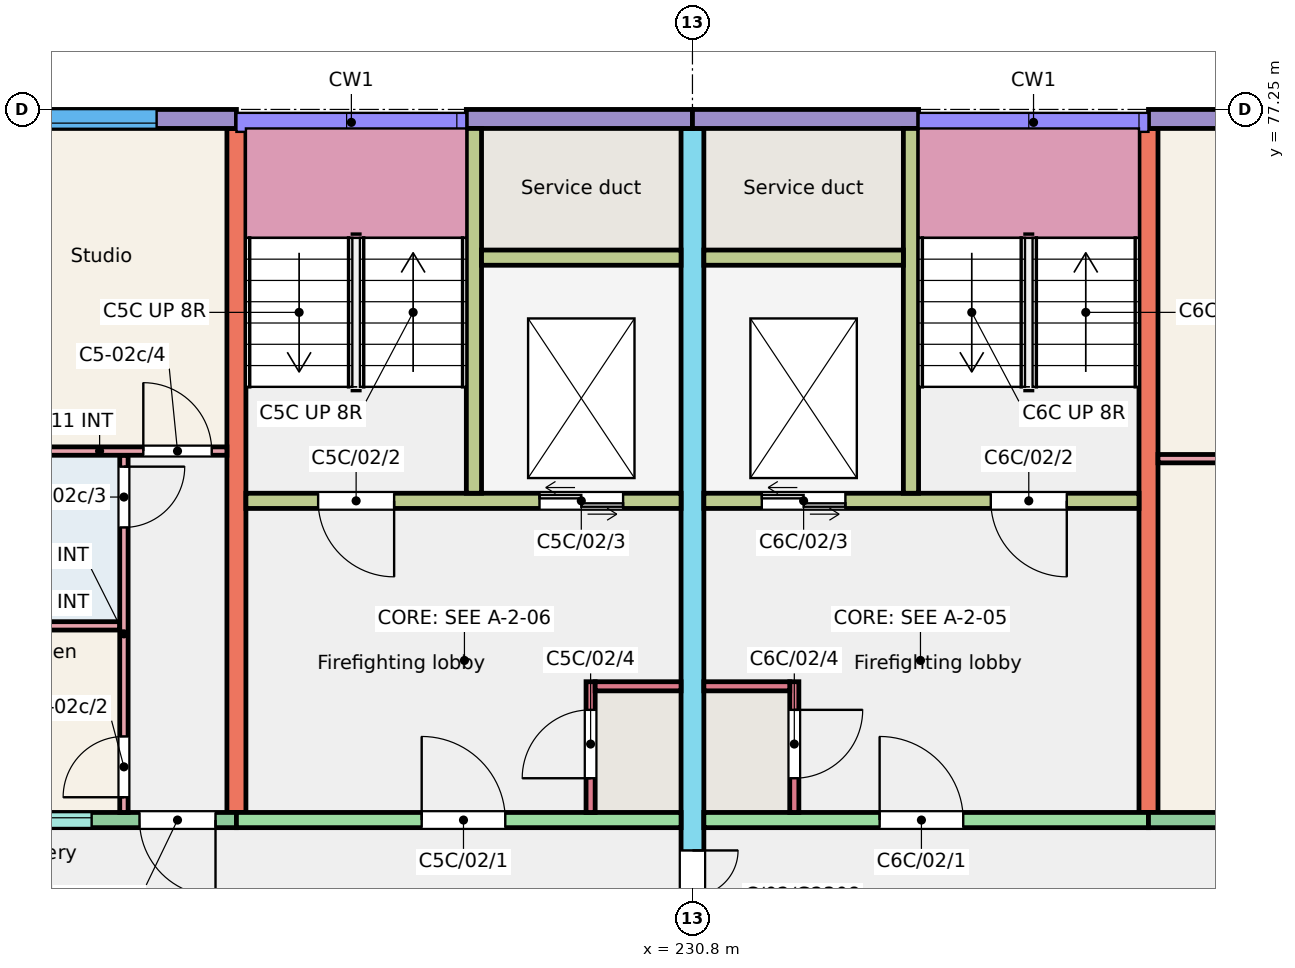
"""IFC4 building model, lengths in metres.
Left out: names, types, materials, properties, quantities, classifications, styles, units other than length and angle.
Written with IfcOpenShell. Run it as: python <this file> out.ifc"""

import sys

from ifc_helpers import new_model, si_unit, direction, frame, frame_2d, origin, place, context, subcontext, project, spatial, rectangle, extrude, element, fill, save


model = new_model("IFC4")
c1 = context("Model", 3, precision=1e-05, world=origin(), true_north=direction((0.0, 1.0)))
c2 = subcontext(c1, "Body", "Model", "MODEL_VIEW")
j1 = project(units=[si_unit("LENGTHUNIT", "METRE"), si_unit("PLANEANGLEUNIT", "RADIAN")], contexts=[c1])
p1 = place(None, origin())
s1 = spatial("IfcSite", under=j1, at=p1, CompositionType="ELEMENT")
p2 = place(p1, origin())
s2 = spatial("IfcBuilding", under=s1, at=p2, CompositionType="ELEMENT")
p3 = place(p2, frame((0.0, 0.0, 6.0)))
s3 = spatial("IfcBuildingStorey", under=s2, at=p3, CompositionType="ELEMENT", Elevation=6.0)
p4 = place(p3, frame((224.8, 68.0, 0.0), z_axis=(0.0, 0.0, 1.0), x_axis=(0.0, 1.0, 0.0)))
e1 = element("IfcWall", 1, at=p4, inside=s3, PredefinedType="SHEAR", context=c2, shape_type="SweptSolid", body=[
    extrude(rectangle(XDim=9.0, YDim=0.25, at=frame_2d((4.5, 0.0))), origin(), (0.0, 0.0, 1.0), 3.0),
])
p5 = place(p3, frame((230.8, 66.0, 0.0), z_axis=(0.0, 0.0, 1.0), x_axis=(0.0, 1.0, 0.0)))
e2 = element("IfcWall", 2, at=p5, inside=s3, PredefinedType="SHEAR", context=c2, shape_type="SweptSolid", body=[
    extrude(rectangle(XDim=11.0, YDim=0.3, at=frame_2d((5.5, 0.0))), origin(), (0.0, 0.0, 1.0), 3.0),
])
p6 = place(p5, frame((0.3, 0.0, 0.0)))
e3 = element("IfcOpeningElement", 3, at=p6, cuts=e2, PredefinedType="OPENING", context=c2, shape_type="SweptSolid", body=[
    extrude(rectangle(XDim=1.2, YDim=2.1, at=frame_2d((0.6, 1.05))), frame((0.0, 0.16, 0.0), z_axis=(0.0, -1.0, 0.0), x_axis=(1.0, 0.0, 0.0)), (0.0, 0.0, 1.0), 0.32),
])
p7 = place(p3, frame((236.8, 68.0, 0.0), z_axis=(0.0, 0.0, 1.0), x_axis=(0.0, 1.0, 0.0)))
e4 = element("IfcWall", 4, at=p7, inside=s3, PredefinedType="SHEAR", context=c2, shape_type="SweptSolid", body=[
    extrude(rectangle(XDim=9.0, YDim=0.25, at=frame_2d((4.5, 0.0))), origin(), (0.0, 0.0, 1.0), 3.0),
])
p8 = place(p3, frame((221.2, 77.125, 0.0), z_axis=(0.0, 0.0, 1.0), x_axis=(1.0, 0.0, 0.0)))
e5 = element("IfcWall", 5, at=p8, inside=s3, PredefinedType="SOLIDWALL", context=c2, shape_type="SweptSolid", body=[
    extrude(rectangle(XDim=3.6, YDim=0.25, at=frame_2d((1.8, 0.0))), origin(), (0.0, 0.0, 1.0), 3.0),
])
p9 = place(p8, frame((1.05, 0.0, 0.9)))
e6 = element("IfcOpeningElement", 6, at=p9, cuts=e5, PredefinedType="OPENING", context=c2, shape_type="SweptSolid", body=[
    extrude(rectangle(XDim=1.5, YDim=1.5, at=frame_2d((0.75, 0.75))), frame((0.0, 0.135, 0.0), z_axis=(0.0, -1.0, 0.0), x_axis=(1.0, 0.0, 0.0)), (0.0, 0.0, 1.0), 0.27),
])
p10 = place(p3, frame((221.2, 67.9, 0.0), z_axis=(0.0, 0.0, 1.0), x_axis=(1.0, 0.0, 0.0)))
e7 = element("IfcWall", 7, at=p10, inside=s3, PredefinedType="SOLIDWALL", context=c2, shape_type="SweptSolid", body=[
    extrude(rectangle(XDim=3.6, YDim=0.2, at=frame_2d((1.8, 0.0))), origin(), (0.0, 0.0, 1.0), 3.0),
])
p11 = place(p10, frame((0.495, 0.0, 1.1)))
e8 = element("IfcOpeningElement", 8, at=p11, cuts=e7, PredefinedType="OPENING", context=c2, shape_type="SweptSolid", body=[
    extrude(rectangle(XDim=1.2, YDim=1.3, at=frame_2d((0.6, 0.65))), frame((0.0, 0.11, 0.0), z_axis=(0.0, -1.0, 0.0), x_axis=(1.0, 0.0, 0.0)), (0.0, 0.0, 1.0), 0.22),
])
p12 = place(p10, frame((2.325, 0.0, 0.0)))
e9 = element("IfcOpeningElement", 9, at=p12, cuts=e7, PredefinedType="OPENING", context=c2, shape_type="SweptSolid", body=[
    extrude(rectangle(XDim=1.0, YDim=2.1, at=frame_2d((0.5, 1.05))), frame((0.0, 0.11, 0.0), z_axis=(0.0, -1.0, 0.0), x_axis=(1.0, 0.0, 0.0)), (0.0, 0.0, 1.0), 0.22),
])
p13 = place(p3, frame((227.825, 77.125, 0.0), z_axis=(0.0, 0.0, 1.0), x_axis=(1.0, 0.0, 0.0)))
e10 = element("IfcWall", 10, at=p13, inside=s3, PredefinedType="SOLIDWALL", context=c2, shape_type="SweptSolid", body=[
    extrude(rectangle(XDim=2.975, YDim=0.25, at=frame_2d((1.488, 0.0))), origin(), (0.0, 0.0, 1.0), 3.0),
])
p14 = place(p3, frame((224.8, 67.9, 0.0), z_axis=(0.0, 0.0, 1.0), x_axis=(1.0, 0.0, 0.0)))
e11 = element("IfcWall", 11, at=p14, inside=s3, PredefinedType="SHEAR", context=c2, shape_type="SweptSolid", body=[
    extrude(rectangle(XDim=5.85, YDim=0.2, at=frame_2d((2.925, 0.0))), origin(), (0.0, 0.0, 1.0), 3.0),
])
p15 = place(p14, frame((2.438, 0.0, 0.0)))
e12 = element("IfcOpeningElement", 12, at=p15, cuts=e11, PredefinedType="OPENING", context=c2, shape_type="SweptSolid", body=[
    extrude(rectangle(XDim=1.1, YDim=2.1, at=frame_2d((0.55, 1.05))), frame((0.0, 0.11, 0.0), z_axis=(0.0, -1.0, 0.0), x_axis=(1.0, 0.0, 0.0)), (0.0, 0.0, 1.0), 0.22),
])
p16 = place(p3, frame((224.925, 72.1, 0.0), z_axis=(0.0, 0.0, 1.0), x_axis=(1.0, 0.0, 0.0)))
e13 = element("IfcWall", 13, at=p16, inside=s3, PredefinedType="SHEAR", context=c2, shape_type="SweptSolid", body=[
    extrude(rectangle(XDim=5.725, YDim=0.2, at=frame_2d((2.862, 0.0))), origin(), (0.0, 0.0, 1.0), 3.0),
])
p17 = place(p16, frame((0.95, 0.0, 0.0)))
e14 = element("IfcOpeningElement", 14, at=p17, cuts=e13, PredefinedType="OPENING", context=c2, shape_type="SweptSolid", body=[
    extrude(rectangle(XDim=1.0, YDim=2.1, at=frame_2d((0.5, 1.05))), frame((0.0, 0.11, 0.0), z_axis=(0.0, -1.0, 0.0), x_axis=(1.0, 0.0, 0.0)), (0.0, 0.0, 1.0), 0.22),
])
p18 = place(p16, frame((3.863, 0.0, 0.0)))
e15 = element("IfcOpeningElement", 15, at=p18, cuts=e13, PredefinedType="OPENING", context=c2, shape_type="SweptSolid", body=[
    extrude(rectangle(XDim=1.1, YDim=2.1, at=frame_2d((0.55, 1.05))), frame((0.0, 0.11, 0.0), z_axis=(0.0, -1.0, 0.0), x_axis=(1.0, 0.0, 0.0)), (0.0, 0.0, 1.0), 0.22),
])
p19 = place(p3, frame((227.925, 72.2, 0.0), z_axis=(0.0, 0.0, 1.0), x_axis=(0.0, 1.0, 0.0)))
e16 = element("IfcWall", 16, at=p19, inside=s3, PredefinedType="SHEAR", context=c2, shape_type="SweptSolid", body=[
    extrude(rectangle(XDim=4.8, YDim=0.2, at=frame_2d((2.4, 0.0))), origin(), (0.0, 0.0, 1.0), 3.0),
])
p20 = place(p3, frame((228.025, 75.3, 0.0), z_axis=(0.0, 0.0, 1.0), x_axis=(1.0, 0.0, 0.0)))
e17 = element("IfcWall", 17, at=p20, inside=s3, PredefinedType="SHEAR", context=c2, shape_type="SweptSolid", body=[
    extrude(rectangle(XDim=2.625, YDim=0.2, at=frame_2d((1.312, 0.0))), origin(), (0.0, 0.0, 1.0), 3.0),
])
p21 = place(p3, frame((229.46, 68.0, 0.0), z_axis=(0.0, 0.0, 1.0), x_axis=(0.0, 1.0, 0.0)))
e18 = element("IfcWall", 18, at=p21, inside=s3, PredefinedType="SHEAR", context=c2, shape_type="SweptSolid", body=[
    extrude(rectangle(XDim=1.72, YDim=0.12, at=frame_2d((0.86, 0.0))), origin(), (0.0, 0.0, 1.0), 3.0),
])
p22 = place(p21, frame((0.45, 0.0, 0.0)))
e19 = element("IfcOpeningElement", 19, at=p22, cuts=e18, PredefinedType="OPENING", context=c2, shape_type="SweptSolid", body=[
    extrude(rectangle(XDim=0.9, YDim=2.1, at=frame_2d((0.45, 1.05))), frame((0.0, 0.07, 0.0), z_axis=(0.0, -1.0, 0.0), x_axis=(1.0, 0.0, 0.0)), (0.0, 0.0, 1.0), 0.14),
])
p23 = place(p3, frame((229.52, 69.66, 0.0), z_axis=(0.0, 0.0, 1.0), x_axis=(1.0, 0.0, 0.0)))
e20 = element("IfcWall", 20, at=p23, inside=s3, PredefinedType="SHEAR", context=c2, shape_type="SweptSolid", body=[
    extrude(rectangle(XDim=1.13, YDim=0.12, at=frame_2d((0.565, 0.0))), origin(), (0.0, 0.0, 1.0), 3.0),
])
p24 = place(p3, frame((230.8, 77.125, 0.0), z_axis=(0.0, 0.0, 1.0), x_axis=(1.0, 0.0, 0.0)))
e21 = element("IfcWall", 21, at=p24, inside=s3, PredefinedType="SOLIDWALL", context=c2, shape_type="SweptSolid", body=[
    extrude(rectangle(XDim=2.975, YDim=0.25, at=frame_2d((1.487, 0.0))), origin(), (0.0, 0.0, 1.0), 3.0),
])
p25 = place(p3, frame((230.95, 67.9, 0.0), z_axis=(0.0, 0.0, 1.0), x_axis=(1.0, 0.0, 0.0)))
e22 = element("IfcWall", 22, at=p25, inside=s3, PredefinedType="SHEAR", context=c2, shape_type="SweptSolid", body=[
    extrude(rectangle(XDim=5.85, YDim=0.2, at=frame_2d((2.925, 0.0))), origin(), (0.0, 0.0, 1.0), 3.0),
])
p26 = place(p25, frame((2.312, 0.0, 0.0)))
e23 = element("IfcOpeningElement", 23, at=p26, cuts=e22, PredefinedType="OPENING", context=c2, shape_type="SweptSolid", body=[
    extrude(rectangle(XDim=1.1, YDim=2.1, at=frame_2d((0.55, 1.05))), frame((0.0, 0.11, 0.0), z_axis=(0.0, -1.0, 0.0), x_axis=(1.0, 0.0, 0.0)), (0.0, 0.0, 1.0), 0.22),
])
p27 = place(p3, frame((230.95, 72.1, 0.0), z_axis=(0.0, 0.0, 1.0), x_axis=(1.0, 0.0, 0.0)))
e24 = element("IfcWall", 24, at=p27, inside=s3, PredefinedType="SHEAR", context=c2, shape_type="SweptSolid", body=[
    extrude(rectangle(XDim=5.725, YDim=0.2, at=frame_2d((2.863, 0.0))), origin(), (0.0, 0.0, 1.0), 3.0),
])
p28 = place(p27, frame((3.775, 0.0, 0.0)))
e25 = element("IfcOpeningElement", 25, at=p28, cuts=e24, PredefinedType="OPENING", context=c2, shape_type="SweptSolid", body=[
    extrude(rectangle(XDim=1.0, YDim=2.1, at=frame_2d((0.5, 1.05))), frame((0.0, 0.11, 0.0), z_axis=(0.0, -1.0, 0.0), x_axis=(1.0, 0.0, 0.0)), (0.0, 0.0, 1.0), 0.22),
])
p29 = place(p27, frame((0.762, 0.0, 0.0)))
e26 = element("IfcOpeningElement", 26, at=p29, cuts=e24, PredefinedType="OPENING", context=c2, shape_type="SweptSolid", body=[
    extrude(rectangle(XDim=1.1, YDim=2.1, at=frame_2d((0.55, 1.05))), frame((0.0, 0.11, 0.0), z_axis=(0.0, -1.0, 0.0), x_axis=(1.0, 0.0, 0.0)), (0.0, 0.0, 1.0), 0.22),
])
p30 = place(p3, frame((233.675, 72.2, 0.0), z_axis=(0.0, 0.0, 1.0), x_axis=(0.0, 1.0, 0.0)))
e27 = element("IfcWall", 27, at=p30, inside=s3, PredefinedType="SHEAR", context=c2, shape_type="SweptSolid", body=[
    extrude(rectangle(XDim=4.8, YDim=0.2, at=frame_2d((2.4, 0.0))), origin(), (0.0, 0.0, 1.0), 3.0),
])
p31 = place(p3, frame((230.95, 75.3, 0.0), z_axis=(0.0, 0.0, 1.0), x_axis=(1.0, 0.0, 0.0)))
e28 = element("IfcWall", 28, at=p31, inside=s3, PredefinedType="SHEAR", context=c2, shape_type="SweptSolid", body=[
    extrude(rectangle(XDim=2.625, YDim=0.2, at=frame_2d((1.312, 0.0))), origin(), (0.0, 0.0, 1.0), 3.0),
])
p32 = place(p3, frame((232.14, 68.0, 0.0), z_axis=(0.0, 0.0, 1.0), x_axis=(0.0, 1.0, 0.0)))
e29 = element("IfcWall", 29, at=p32, inside=s3, PredefinedType="SHEAR", context=c2, shape_type="SweptSolid", body=[
    extrude(rectangle(XDim=1.72, YDim=0.12, at=frame_2d((0.86, 0.0))), origin(), (0.0, 0.0, 1.0), 3.0),
])
p33 = place(p32, frame((0.45, 0.0, 0.0)))
e30 = element("IfcOpeningElement", 30, at=p33, cuts=e29, PredefinedType="OPENING", context=c2, shape_type="SweptSolid", body=[
    extrude(rectangle(XDim=0.9, YDim=2.1, at=frame_2d((0.45, 1.05))), frame((0.0, 0.07, 0.0), z_axis=(0.0, -1.0, 0.0), x_axis=(1.0, 0.0, 0.0)), (0.0, 0.0, 1.0), 0.14),
])
p34 = place(p3, frame((230.95, 69.66, 0.0), z_axis=(0.0, 0.0, 1.0), x_axis=(1.0, 0.0, 0.0)))
e31 = element("IfcWall", 31, at=p34, inside=s3, PredefinedType="SHEAR", context=c2, shape_type="SweptSolid", body=[
    extrude(rectangle(XDim=1.13, YDim=0.12, at=frame_2d((0.565, 0.0))), origin(), (0.0, 0.0, 1.0), 3.0),
])
p35 = place(p3, frame((236.8, 77.125, 0.0), z_axis=(0.0, 0.0, 1.0), x_axis=(1.0, 0.0, 0.0)))
e32 = element("IfcWall", 32, at=p35, inside=s3, PredefinedType="SOLIDWALL", context=c2, shape_type="SweptSolid", body=[
    extrude(rectangle(XDim=3.6, YDim=0.25, at=frame_2d((1.8, 0.0))), origin(), (0.0, 0.0, 1.0), 3.0),
])
p36 = place(p35, frame((1.212, 0.0, 1.1)))
e33 = element("IfcOpeningElement", 33, at=p36, cuts=e32, PredefinedType="OPENING", context=c2, shape_type="SweptSolid", body=[
    extrude(rectangle(XDim=1.2, YDim=1.3, at=frame_2d((0.6, 0.65))), frame((0.0, 0.135, 0.0), z_axis=(0.0, -1.0, 0.0), x_axis=(1.0, 0.0, 0.0)), (0.0, 0.0, 1.0), 0.27),
])
p37 = place(p3, frame((236.8, 67.9, 0.0), z_axis=(0.0, 0.0, 1.0), x_axis=(1.0, 0.0, 0.0)))
e34 = element("IfcWall", 34, at=p37, inside=s3, PredefinedType="SOLIDWALL", context=c2, shape_type="SweptSolid", body=[
    extrude(rectangle(XDim=3.6, YDim=0.2, at=frame_2d((1.8, 0.0))), origin(), (0.0, 0.0, 1.0), 3.0),
])
p38 = place(p37, frame((1.062, 0.0, 0.9)))
e35 = element("IfcOpeningElement", 35, at=p38, cuts=e34, PredefinedType="OPENING", context=c2, shape_type="SweptSolid", body=[
    extrude(rectangle(XDim=1.5, YDim=1.5, at=frame_2d((0.75, 0.75))), frame((0.0, 0.11, 0.0), z_axis=(0.0, -1.0, 0.0), x_axis=(1.0, 0.0, 0.0)), (0.0, 0.0, 1.0), 0.22),
])
p39 = place(p3, frame((221.325, 70.455, 0.0), z_axis=(0.0, 0.0, 1.0), x_axis=(1.0, 0.0, 0.0)))
e36 = element("IfcWall", 36, at=p39, inside=s3, PredefinedType="PARTITIONING", context=c2, shape_type="SweptSolid", body=[
    extrude(rectangle(XDim=1.94, YDim=0.11, at=frame_2d((0.97, 0.0))), origin(), (0.0, 0.0, 1.0), 2.8),
])
p40 = place(p3, frame((223.32, 68.0, 0.0), z_axis=(0.0, 0.0, 1.0), x_axis=(0.0, 1.0, 0.0)))
e37 = element("IfcWall", 37, at=p40, inside=s3, PredefinedType="PARTITIONING", context=c2, shape_type="SweptSolid", body=[
    extrude(rectangle(XDim=4.7, YDim=0.11, at=frame_2d((2.35, 0.0))), origin(), (0.0, 0.0, 1.0), 2.8),
])
p41 = place(p40, frame((0.2, 0.0, 0.0)))
e38 = element("IfcOpeningElement", 38, at=p41, cuts=e37, PredefinedType="OPENING", context=c2, shape_type="SweptSolid", body=[
    extrude(rectangle(XDim=0.8, YDim=2.1, at=frame_2d((0.4, 1.05))), frame((0.0, 0.065, 0.0), z_axis=(0.0, -1.0, 0.0), x_axis=(1.0, 0.0, 0.0)), (0.0, 0.0, 1.0), 0.13),
])
p42 = place(p40, frame((3.75, 0.0, 0.0)))
e39 = element("IfcOpeningElement", 39, at=p42, cuts=e37, PredefinedType="OPENING", context=c2, shape_type="SweptSolid", body=[
    extrude(rectangle(XDim=0.8, YDim=2.1, at=frame_2d((0.4, 1.05))), frame((0.0, 0.065, 0.0), z_axis=(0.0, -1.0, 0.0), x_axis=(1.0, 0.0, 0.0)), (0.0, 0.0, 1.0), 0.13),
])
p43 = place(p3, frame((221.325, 72.755, 0.0), z_axis=(0.0, 0.0, 1.0), x_axis=(1.0, 0.0, 0.0)))
e40 = element("IfcWall", 40, at=p43, inside=s3, PredefinedType="PARTITIONING", context=c2, shape_type="SweptSolid", body=[
    extrude(rectangle(XDim=3.35, YDim=0.11, at=frame_2d((1.675, 0.0))), origin(), (0.0, 0.0, 1.0), 2.8),
])
p44 = place(p43, frame((2.25, 0.0, 0.0)))
e41 = element("IfcOpeningElement", 41, at=p44, cuts=e40, PredefinedType="OPENING", context=c2, shape_type="SweptSolid", body=[
    extrude(rectangle(XDim=0.9, YDim=2.1, at=frame_2d((0.45, 1.05))), frame((0.0, 0.065, 0.0), z_axis=(0.0, -1.0, 0.0), x_axis=(1.0, 0.0, 0.0)), (0.0, 0.0, 1.0), 0.13),
])
p45 = place(p3, frame((236.925, 72.655, 0.0), z_axis=(0.0, 0.0, 1.0), x_axis=(1.0, 0.0, 0.0)))
e42 = element("IfcWall", 42, at=p45, inside=s3, PredefinedType="PARTITIONING", context=c2, shape_type="SweptSolid", body=[
    extrude(rectangle(XDim=3.375, YDim=0.11, at=frame_2d((1.688, 0.0))), origin(), (0.0, 0.0, 1.0), 2.8),
])
p46 = place(p11, origin())
e43 = element("IfcWindow", 43, at=p46, inside=s3, PartitioningType="SINGLE_PANEL", PredefinedType="WINDOW", context=c2, shape_type="SweptSolid", body=[
    extrude(rectangle(XDim=1.2, YDim=1.3, at=frame_2d((0.6, 0.65))), frame((0.0, 0.06, 0.0), z_axis=(0.0, -1.0, 0.0), x_axis=(1.0, 0.0, 0.0)), (0.0, 0.0, 1.0), 0.06),
])
fill(e8, e43)
p47 = place(p9, origin())
e44 = element("IfcWindow", 44, at=p47, inside=s3, PartitioningType="SINGLE_PANEL", PredefinedType="WINDOW", context=c2, shape_type="SweptSolid", body=[
    extrude(rectangle(XDim=1.5, YDim=1.5, at=frame_2d((0.75, 0.75))), frame((0.0, -0.025, 0.0), z_axis=(0.0, -1.0, 0.0), x_axis=(1.0, 0.0, 0.0)), (0.0, 0.0, 1.0), 0.06),
])
fill(e6, e44)
p48 = place(p12, origin())
e45 = element("IfcDoor", 45, at=p48, inside=s3, OperationType="SINGLE_SWING_RIGHT", PredefinedType="DOOR", context=c2, shape_type="SweptSolid", body=[
    extrude(rectangle(XDim=1.0, YDim=2.1, at=frame_2d((0.5, 1.05))), frame((0.0, 0.025, 0.0), z_axis=(0.0, -1.0, 0.0), x_axis=(1.0, 0.0, 0.0)), (0.0, 0.0, 1.0), 0.05),
])
fill(e9, e45)
p49 = place(p41, origin())
e46 = element("IfcDoor", 46, at=p49, inside=s3, OperationType="SINGLE_SWING_LEFT", PredefinedType="DOOR", context=c2, shape_type="SweptSolid", body=[
    extrude(rectangle(XDim=0.8, YDim=2.1, at=frame_2d((0.4, 1.05))), frame((0.0, 0.025, 0.0), z_axis=(0.0, -1.0, 0.0), x_axis=(1.0, 0.0, 0.0)), (0.0, 0.0, 1.0), 0.05),
])
fill(e38, e46)
p50 = place(p42, origin())
e47 = element("IfcDoor", 47, at=p50, inside=s3, OperationType="SINGLE_SWING_RIGHT", PredefinedType="DOOR", context=c2, shape_type="SweptSolid", body=[
    extrude(rectangle(XDim=0.8, YDim=2.1, at=frame_2d((0.4, 1.05))), frame((0.0, 0.025, 0.0), z_axis=(0.0, -1.0, 0.0), x_axis=(1.0, 0.0, 0.0)), (0.0, 0.0, 1.0), 0.05),
])
fill(e39, e47)
p51 = place(p44, origin())
e48 = element("IfcDoor", 48, at=p51, inside=s3, OperationType="SINGLE_SWING_LEFT", PredefinedType="DOOR", context=c2, shape_type="SweptSolid", body=[
    extrude(rectangle(XDim=0.9, YDim=2.1, at=frame_2d((0.45, 1.05))), frame((0.0, 0.025, 0.0), z_axis=(0.0, -1.0, 0.0), x_axis=(1.0, 0.0, 0.0)), (0.0, 0.0, 1.0), 0.05),
])
fill(e41, e48)
p52 = place(p15, origin())
e49 = element("IfcDoor", 49, at=p52, inside=s3, OperationType="SINGLE_SWING_LEFT", PredefinedType="DOOR", context=c2, shape_type="SweptSolid", body=[
    extrude(rectangle(XDim=1.1, YDim=2.1, at=frame_2d((0.55, 1.05))), frame((0.0, 0.025, 0.0), z_axis=(0.0, -1.0, 0.0), x_axis=(1.0, 0.0, 0.0)), (0.0, 0.0, 1.0), 0.05),
])
fill(e12, e49)
p53 = place(p17, origin())
e50 = element("IfcDoor", 50, at=p53, inside=s3, OperationType="SINGLE_SWING_RIGHT", PredefinedType="DOOR", context=c2, shape_type="SweptSolid", body=[
    extrude(rectangle(XDim=1.0, YDim=2.1, at=frame_2d((0.5, 1.05))), frame((0.0, 0.025, 0.0), z_axis=(0.0, -1.0, 0.0), x_axis=(1.0, 0.0, 0.0)), (0.0, 0.0, 1.0), 0.05),
])
fill(e14, e50)
p54 = place(p18, origin())
e51 = element("IfcDoor", 51, at=p54, inside=s3, OperationType="DOUBLE_DOOR_SLIDING", PredefinedType="DOOR", context=c2, shape_type="SweptSolid", body=[
    extrude(rectangle(XDim=1.1, YDim=2.1, at=frame_2d((0.55, 1.05))), frame((0.0, 0.025, 0.0), z_axis=(0.0, -1.0, 0.0), x_axis=(1.0, 0.0, 0.0)), (0.0, 0.0, 1.0), 0.05),
])
fill(e15, e51)
p55 = place(p22, origin())
e52 = element("IfcDoor", 52, at=p55, inside=s3, OperationType="SINGLE_SWING_LEFT", PredefinedType="DOOR", context=c2, shape_type="SweptSolid", body=[
    extrude(rectangle(XDim=0.9, YDim=2.1, at=frame_2d((0.45, 1.05))), frame((0.0, 0.025, 0.0), z_axis=(0.0, -1.0, 0.0), x_axis=(1.0, 0.0, 0.0)), (0.0, 0.0, 1.0), 0.05),
])
fill(e19, e52)
p56 = place(p26, origin())
e53 = element("IfcDoor", 53, at=p56, inside=s3, OperationType="SINGLE_SWING_LEFT", PredefinedType="DOOR", context=c2, shape_type="SweptSolid", body=[
    extrude(rectangle(XDim=1.1, YDim=2.1, at=frame_2d((0.55, 1.05))), frame((0.0, 0.025, 0.0), z_axis=(0.0, -1.0, 0.0), x_axis=(1.0, 0.0, 0.0)), (0.0, 0.0, 1.0), 0.05),
])
fill(e23, e53)
p57 = place(p28, origin())
e54 = element("IfcDoor", 54, at=p57, inside=s3, OperationType="SINGLE_SWING_RIGHT", PredefinedType="DOOR", context=c2, shape_type="SweptSolid", body=[
    extrude(rectangle(XDim=1.0, YDim=2.1, at=frame_2d((0.5, 1.05))), frame((0.0, 0.025, 0.0), z_axis=(0.0, -1.0, 0.0), x_axis=(1.0, 0.0, 0.0)), (0.0, 0.0, 1.0), 0.05),
])
fill(e25, e54)
p58 = place(p29, origin())
e55 = element("IfcDoor", 55, at=p58, inside=s3, OperationType="DOUBLE_DOOR_SLIDING", PredefinedType="DOOR", context=c2, shape_type="SweptSolid", body=[
    extrude(rectangle(XDim=1.1, YDim=2.1, at=frame_2d((0.55, 1.05))), frame((0.0, 0.025, 0.0), z_axis=(0.0, -1.0, 0.0), x_axis=(1.0, 0.0, 0.0)), (0.0, 0.0, 1.0), 0.05),
])
fill(e26, e55)
p59 = place(p33, origin())
e56 = element("IfcDoor", 56, at=p59, inside=s3, OperationType="SINGLE_SWING_RIGHT", PredefinedType="DOOR", context=c2, shape_type="SweptSolid", body=[
    extrude(rectangle(XDim=0.9, YDim=2.1, at=frame_2d((0.45, 1.05))), frame((0.0, 0.025, 0.0), z_axis=(0.0, -1.0, 0.0), x_axis=(1.0, 0.0, 0.0)), (0.0, 0.0, 1.0), 0.05),
])
fill(e30, e56)
p60 = place(p6, origin())
e57 = element("IfcDoor", 57, at=p60, inside=s3, OperationType="DOUBLE_DOOR_SINGLE_SWING", PredefinedType="DOOR", context=c2, shape_type="SweptSolid", body=[
    extrude(rectangle(XDim=1.2, YDim=2.1, at=frame_2d((0.6, 1.05))), frame((0.0, 0.025, 0.0), z_axis=(0.0, -1.0, 0.0), x_axis=(1.0, 0.0, 0.0)), (0.0, 0.0, 1.0), 0.05),
])
fill(e3, e57)
save(model, sys.argv[1])
